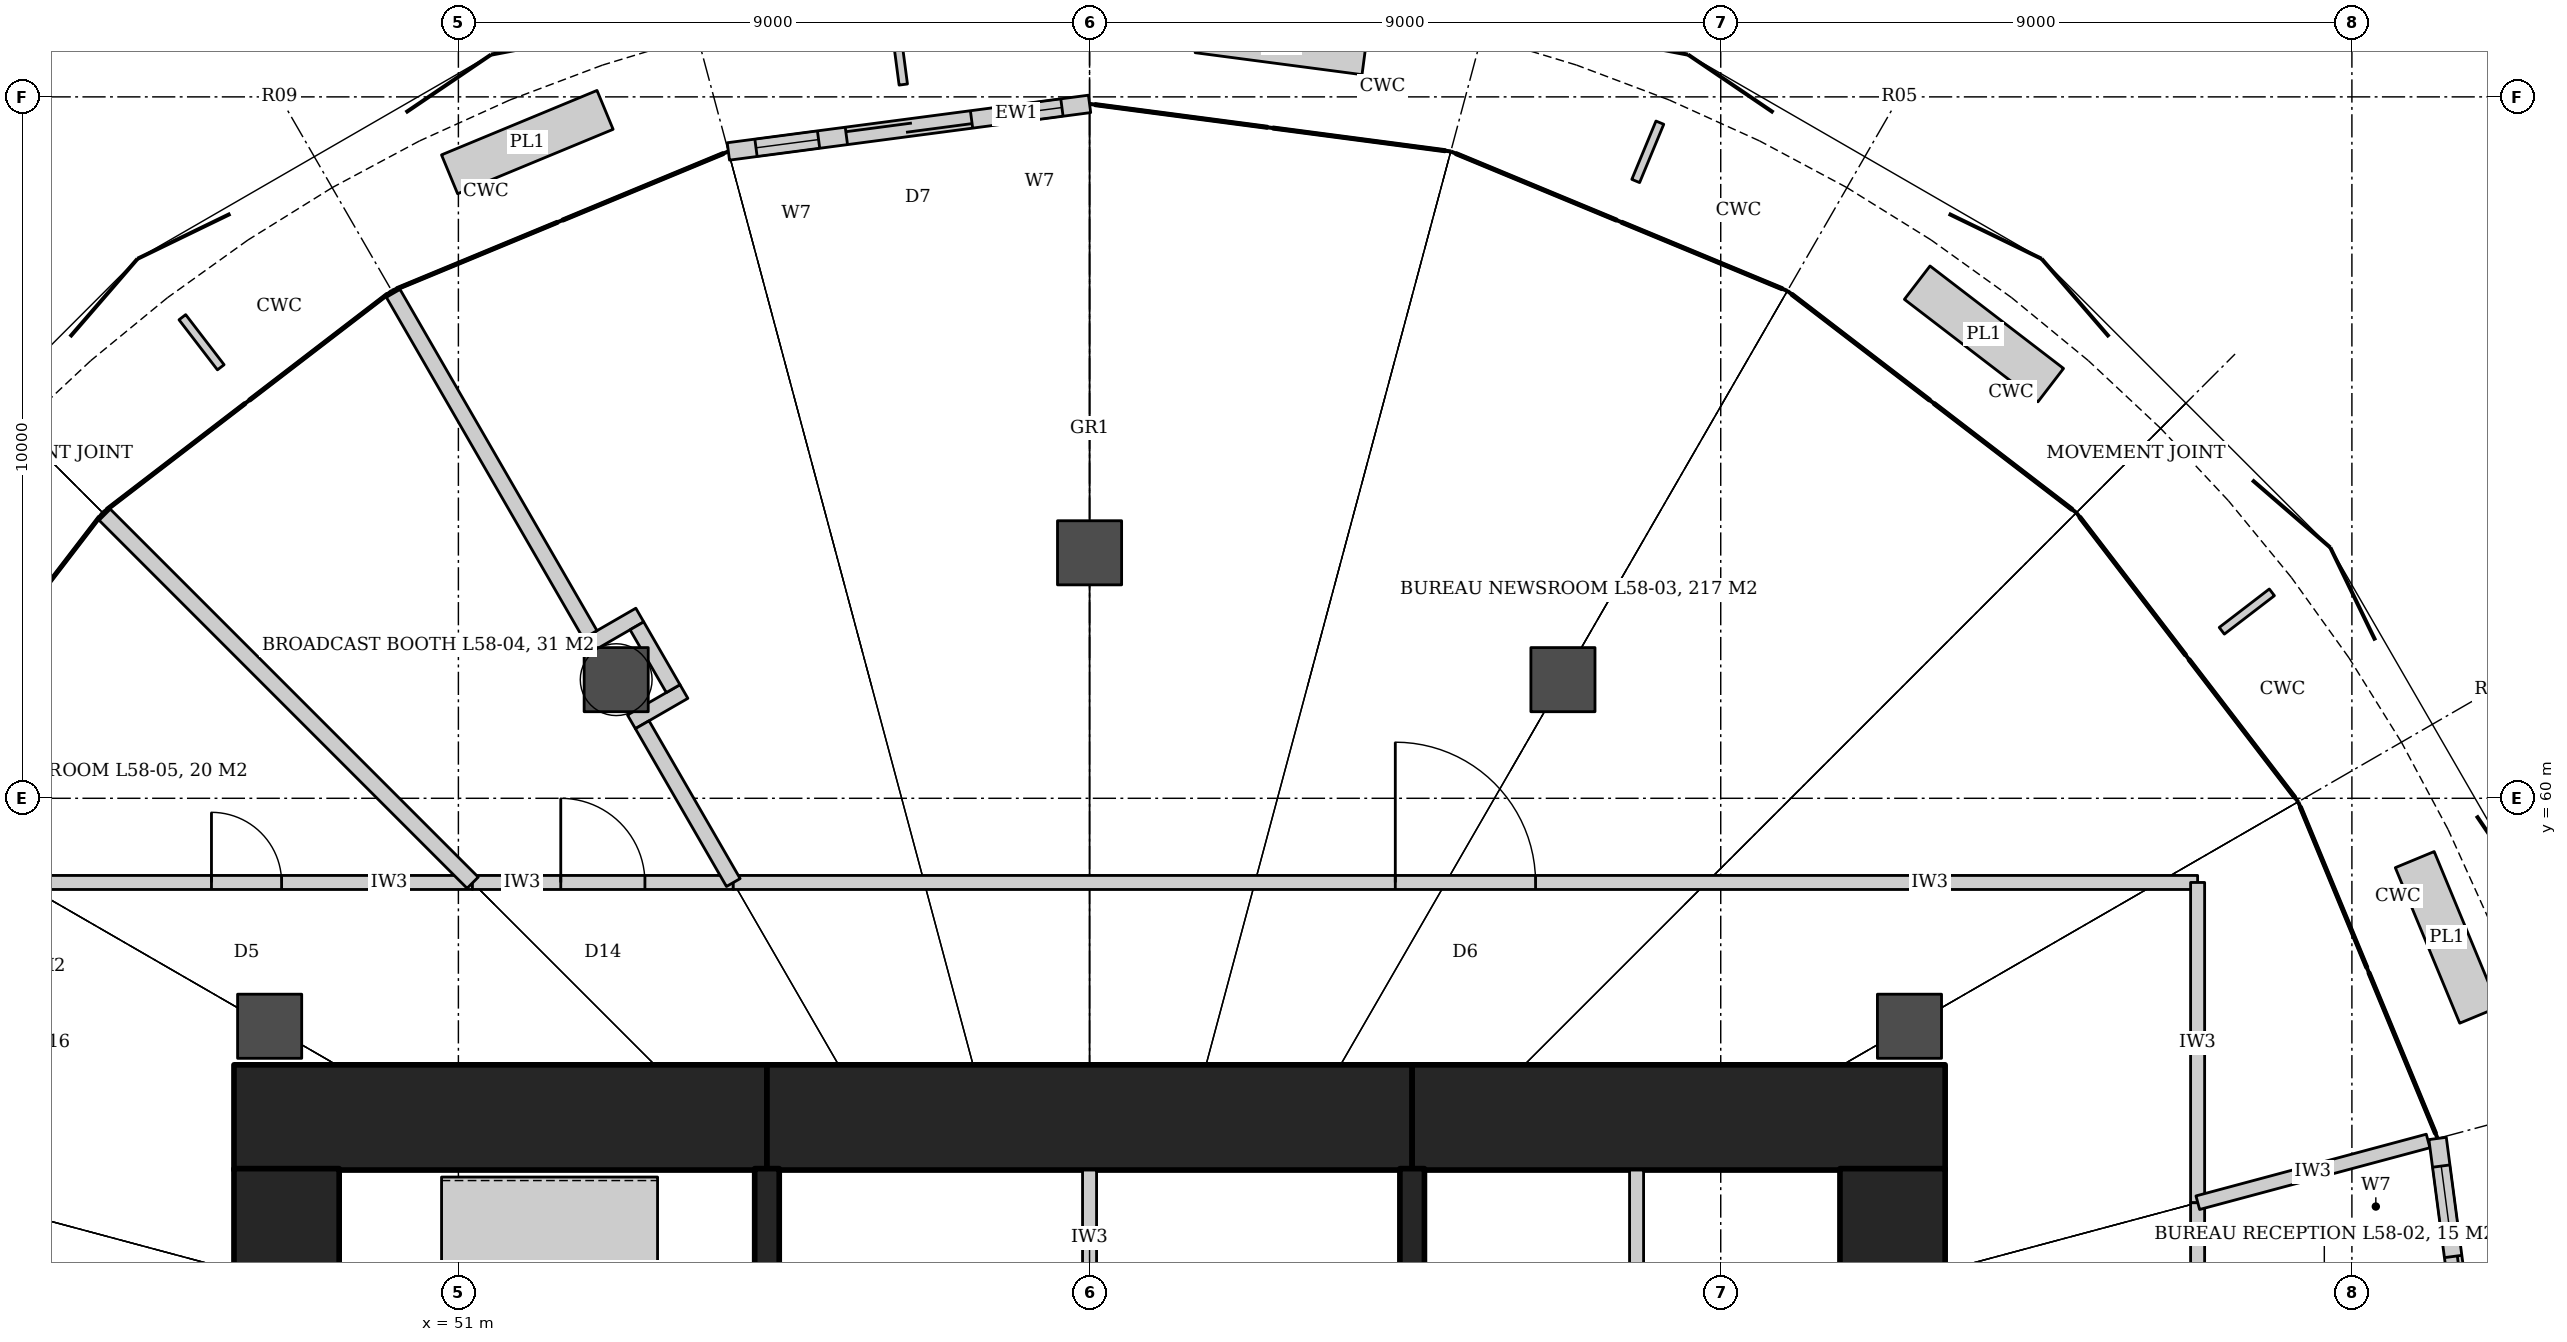
"""IFC4 building model, lengths in metres.
Left out: names, types, materials, properties, quantities, classifications, styles, units other than length and angle.
Written with IfcOpenShell. Run it as: python <this file> out.ifc"""

import sys

from ifc_helpers import new_model, si_unit, direction, frame, frame_2d, origin, origin_2d, place, context, subcontext, project, spatial, rectangle, hollow_circle, extrude, element, fill, save


model = new_model("IFC4")
c1 = context("Model", 3, precision=1e-05, world=origin(), true_north=direction((0.0, 1.0)))
c2 = subcontext(c1, "Body", "Model", "MODEL_VIEW")
j1 = project(units=[si_unit("LENGTHUNIT", "METRE"), si_unit("PLANEANGLEUNIT", "RADIAN")], contexts=[c1])
p1 = place(None, origin())
s1 = spatial("IfcSite", under=j1, at=p1, CompositionType="ELEMENT")
p2 = place(p1, origin())
s2 = spatial("IfcBuilding", under=s1, at=p2, CompositionType="ELEMENT")
p3 = place(p2, frame((0.0, 0.0, 252.8)))
s3 = spatial("IfcBuildingStorey", under=s2, at=p3, CompositionType="ELEMENT", Elevation=252.8)
p4 = place(p3, frame((47.8, 55.45, 0.0), z_axis=(0.0, 0.0, 1.0), x_axis=(1.0, 0.0, 0.0)))
e1 = element("IfcWall", 1, at=p4, inside=s3, PredefinedType="SHEAR", context=c2, shape_type="SweptSolid", body=[
    extrude(rectangle(XDim=7.6, YDim=1.5, at=frame_2d((3.8, 0.0))), origin(), (0.0, 0.0, 1.0), 4.2),
])
p5 = place(p3, frame((55.4, 55.45, 0.0), z_axis=(0.0, 0.0, 1.0), x_axis=(1.0, 0.0, 0.0)))
e2 = element("IfcWall", 2, at=p5, inside=s3, PredefinedType="SHEAR", context=c2, shape_type="SweptSolid", body=[
    extrude(rectangle(XDim=9.2, YDim=1.5, at=frame_2d((4.6, 0.0))), origin(), (0.0, 0.0, 1.0), 4.2),
])
p6 = place(p3, frame((64.6, 55.45, 0.0), z_axis=(0.0, 0.0, 1.0), x_axis=(1.0, 0.0, 0.0)))
e3 = element("IfcWall", 3, at=p6, inside=s3, PredefinedType="SHEAR", context=c2, shape_type="SweptSolid", body=[
    extrude(rectangle(XDim=7.6, YDim=1.5, at=frame_2d((3.8, 0.0))), origin(), (0.0, 0.0, 1.0), 4.2),
])
for number, where, z_axis, x_axis in (
    (4, (71.45, 51.5, 0.0), (0.0, 0.0, 1.0), (0.0, 1.0, 0.0)),
    (5, (48.55, 51.5, 0.0), (0.0, 0.0, 1.0), (0.0, 1.0, 0.0)),
):
    element("IfcWall", number, at=place(p3, frame(where, z_axis=z_axis, x_axis=x_axis)), inside=s3, PredefinedType="SHEAR", context=c2, shape_type="SweptSolid", body=[
        extrude(rectangle(XDim=3.22, YDim=1.5, at=frame_2d((1.61, 0.0))), origin(), (0.0, 0.0, 1.0), 4.2),
    ])
for number, where, z_axis, x_axis in (
    (6, (55.4, 51.655, 0.0), (0.0, 0.0, 1.0), (0.0, 1.0, 0.0)),
    (7, (64.6, 51.655, 0.0), (0.0, 0.0, 1.0), (0.0, 1.0, 0.0)),
):
    element("IfcWall", number, at=place(p3, frame(where, z_axis=z_axis, x_axis=x_axis)), inside=s3, PredefinedType="SHEAR", context=c2, shape_type="SweptSolid", body=[
        extrude(rectangle(XDim=3.065, YDim=0.35, at=frame_2d((1.532, 0.0))), origin(), (0.0, 0.0, 1.0), 4.2),
    ])
for number, where, z_axis, x_axis in (
    (8, (71.691, 56.75, 0.0), (0.0, 0.0, 1.0), (1.0, 0.0, 0.0)),
    (9, (66.75, 61.691, 0.0), (0.0, 0.0, 1.0), (1.0, 0.0, 0.0)),
    (10, (60.0, 63.5, 0.0), (0.0, 0.0, 1.0), (1.0, 0.0, 0.0)),
    (11, (53.25, 61.691, 0.0), (0.0, 0.0, 1.0), (1.0, 0.0, 0.0)),
    (12, (48.309, 56.75, 0.0), (0.0, 0.0, 1.0), (1.0, 0.0, 0.0)),
):
    element("IfcColumn", number, at=place(p3, frame(where, z_axis=z_axis, x_axis=x_axis)), inside=s3, PredefinedType="COLUMN", context=c2, shape_type="SweptSolid", body=[
        extrude(hollow_circle(Radius=0.457, WallThickness=0.045, at=origin_2d()), origin(), (0.0, 0.0, 1.0), 4.2),
    ])
p7 = place(p3, frame((44.758, 58.8, 0.0), z_axis=(0.0, 0.0, 1.0), x_axis=(1.0, 0.0, 0.0)))
e13 = element("IfcWall", 13, at=p7, inside=s3, PredefinedType="PARTITIONING", context=c2, shape_type="SweptSolid", body=[
    extrude(rectangle(XDim=6.442, YDim=0.2, at=frame_2d((3.221, 0.0))), origin(), (0.0, 0.0, 1.0), 3.02),
])
p8 = place(p7, frame((2.721, 0.0, 0.0)))
e14 = element("IfcOpeningElement", 14, at=p8, cuts=e13, PredefinedType="OPENING", context=c2, shape_type="SweptSolid", body=[
    extrude(rectangle(XDim=1.0, YDim=2.1, at=frame_2d((0.5, 1.05))), frame((0.0, 0.11, 0.0), z_axis=(0.0, -1.0, 0.0), x_axis=(1.0, 0.0, 0.0)), (0.0, 0.0, 1.0), 0.22),
])
p9 = place(p3, frame((51.2, 58.8, 0.0), z_axis=(0.0, 0.0, 1.0), x_axis=(1.0, 0.0, 0.0)))
e15 = element("IfcWall", 15, at=p9, inside=s3, PredefinedType="PARTITIONING", context=c2, shape_type="SweptSolid", body=[
    extrude(rectangle(XDim=3.719, YDim=0.2, at=frame_2d((1.86, 0.0))), origin(), (0.0, 0.0, 1.0), 3.04),
])
p10 = place(p9, frame((1.26, 0.0, 0.0)))
e16 = element("IfcOpeningElement", 16, at=p10, cuts=e15, PredefinedType="OPENING", context=c2, shape_type="SweptSolid", body=[
    extrude(rectangle(XDim=1.2, YDim=2.4, at=frame_2d((0.6, 1.2))), frame((0.0, 0.11, 0.0), z_axis=(0.0, -1.0, 0.0), x_axis=(1.0, 0.0, 0.0)), (0.0, 0.0, 1.0), 0.22),
])
p11 = place(p3, frame((54.919, 58.8, 0.0), z_axis=(0.0, 0.0, 1.0), x_axis=(1.0, 0.0, 0.0)))
e17 = element("IfcWall", 17, at=p11, inside=s3, PredefinedType="PARTITIONING", context=c2, shape_type="SweptSolid", body=[
    extrude(rectangle(XDim=20.881, YDim=0.2, at=frame_2d((10.44, 0.0))), origin(), (0.0, 0.0, 1.0), 3.02),
])
p12 = place(p11, frame((9.44, 0.0, 0.0)))
e18 = element("IfcOpeningElement", 18, at=p12, cuts=e17, PredefinedType="OPENING", context=c2, shape_type="SweptSolid", body=[
    extrude(rectangle(XDim=2.0, YDim=2.1, at=frame_2d((1.0, 1.05))), frame((0.0, 0.11, 0.0), z_axis=(0.0, -1.0, 0.0), x_axis=(1.0, 0.0, 0.0)), (0.0, 0.0, 1.0), 0.22),
])
p13 = place(p3, frame((75.8, 58.8, 0.0), z_axis=(0.0, 0.0, 1.0), x_axis=(0.0, -1.0, 0.0)))
e19 = element("IfcWall", 19, at=p13, inside=s3, PredefinedType="PARTITIONING", context=c2, shape_type="SweptSolid", body=[
    extrude(rectangle(XDim=4.566, YDim=0.2, at=frame_2d((2.283, 0.0))), origin(), (0.0, 0.0, 1.0), 3.02),
])
p14 = place(p3, frame((75.8, 54.234, 0.0), z_axis=(0.0, 0.0, 1.0), x_axis=(0.0, -1.0, 0.0)))
e20 = element("IfcWall", 20, at=p14, inside=s3, PredefinedType="PARTITIONING", context=c2, shape_type="SweptSolid", body=[
    extrude(rectangle(XDim=4.234, YDim=0.2, at=frame_2d((2.117, 0.0))), origin(), (0.0, 0.0, 1.0), 3.02),
])
p15 = place(p14, frame((1.317, 0.0, 0.0)))
e21 = element("IfcOpeningElement", 21, at=p15, cuts=e20, PredefinedType="OPENING", context=c2, shape_type="SweptSolid", body=[
    extrude(rectangle(XDim=1.6, YDim=2.4, at=frame_2d((0.8, 1.2))), frame((0.0, 0.11, 0.0), z_axis=(0.0, -1.0, 0.0), x_axis=(1.0, 0.0, 0.0)), (0.0, 0.0, 1.0), 0.22),
])
p16 = place(p3, frame((75.802, 54.234, 0.0), z_axis=(0.0, 0.0, 1.0), x_axis=(0.965933949521, 0.258788726886, 0.0)))
e22 = element("IfcWall", 22, at=p16, inside=s3, PredefinedType="PARTITIONING", context=c2, shape_type="SweptSolid", body=[
    extrude(rectangle(XDim=3.4, YDim=0.2, at=frame_2d((1.7, 0.0))), origin(), (0.0, 0.0, 1.0), 3.02),
])
p17 = place(p3, frame((53.467, 61.09, 0.0), z_axis=(0.0, 0.0, 1.0), x_axis=(0.86599279096, 0.500056482814, 0.0)))
e23 = element("IfcWall", 23, at=p17, inside=s3, PredefinedType="PARTITIONING", context=c2, shape_type="SweptSolid", body=[
    extrude(rectangle(XDim=0.865, YDim=0.225, at=frame_2d((0.432, 0.0))), origin(), (0.0, 0.0, 1.0), 3.02),
])
p18 = place(p3, frame((52.838, 62.18, 0.0), z_axis=(0.0, 0.0, 1.0), x_axis=(0.866044474677, 0.49996696679, 0.0)))
e24 = element("IfcWall", 24, at=p18, inside=s3, PredefinedType="PARTITIONING", context=c2, shape_type="SweptSolid", body=[
    extrude(rectangle(XDim=0.864, YDim=0.225, at=frame_2d((0.432, 0.0))), origin(), (0.0, 0.0, 1.0), 3.02),
])
p19 = place(p3, frame((54.062, 61.563, 0.0), z_axis=(0.0, 0.0, 1.0), x_axis=(-0.499974592989, 0.866040072032, 0.0)))
e25 = element("IfcWall", 25, at=p19, inside=s3, PredefinedType="PARTITIONING", context=c2, shape_type="SweptSolid", body=[
    extrude(rectangle(XDim=1.034, YDim=0.225, at=frame_2d((0.517, 0.0))), origin(), (0.0, 0.0, 1.0), 3.02),
])
p20 = place(p3, frame((54.92, 58.799, 0.0), z_axis=(0.0, 0.0, 1.0), x_axis=(-0.499939380126, 0.866060399857, 0.0)))
e26 = element("IfcWall", 26, at=p20, inside=s3, PredefinedType="PARTITIONING", context=c2, shape_type="SweptSolid", body=[
    extrude(rectangle(XDim=2.598, YDim=0.225, at=frame_2d((1.299, 0.0))), origin(), (0.0, 0.0, 1.0), 3.04),
])
p21 = place(p3, frame((52.879, 62.334, 0.0), z_axis=(0.0, 0.0, 1.0), x_axis=(-0.499985783765, 0.866033611376, 0.0)))
e27 = element("IfcWall", 27, at=p21, inside=s3, PredefinedType="PARTITIONING", context=c2, shape_type="SweptSolid", body=[
    extrude(rectangle(XDim=5.618, YDim=0.225, at=frame_2d((2.809, 0.0))), origin(), (0.0, 0.0, 1.0), 3.02),
])
p22 = place(p3, frame((51.204, 58.796, 0.0), z_axis=(0.0, 0.0, 1.0), x_axis=(-0.707106781187, 0.707106781187, 0.0)))
e28 = element("IfcWall", 28, at=p22, inside=s3, PredefinedType="PARTITIONING", context=c2, shape_type="SweptSolid", body=[
    extrude(rectangle(XDim=7.42, YDim=0.225, at=frame_2d((3.71, 0.0))), origin(), (0.0, 0.0, 1.0), 3.02),
])
p23 = place(p3, frame((79.9, 50.0, 0.0), z_axis=(0.0, 0.0, 1.0), x_axis=(-0.130510435174, 0.991446935701, 0.0)))
e29 = element("IfcWall", 29, at=p23, inside=s3, PredefinedType="SOLIDWALL", context=c2, shape_type="SweptSolid", body=[
    extrude(rectangle(XDim=5.195, YDim=0.25, at=frame_2d((2.597, 0.0))), origin(), (0.0, 0.0, 1.0), 4.04),
])
p24 = place(p23, frame((1.698, 0.0, 0.0)))
e30 = element("IfcOpeningElement", 30, at=p24, cuts=e29, PredefinedType="OPENING", context=c2, shape_type="SweptSolid", body=[
    extrude(rectangle(XDim=1.8, YDim=2.4, at=frame_2d((0.9, 1.2))), frame((0.0, 0.135, 0.0), z_axis=(0.0, -1.0, 0.0), x_axis=(1.0, 0.0, 0.0)), (0.0, 0.0, 1.0), 0.27),
])
p25 = place(p23, frame((0.397, 0.0, 0.0)))
e31 = element("IfcOpeningElement", 31, at=p25, cuts=e29, PredefinedType="OPENING", context=c2, shape_type="SweptSolid", body=[
    extrude(rectangle(XDim=0.9, YDim=2.4, at=frame_2d((0.45, 1.2))), frame((0.0, 0.135, 0.0), z_axis=(0.0, -1.0, 0.0), x_axis=(1.0, 0.0, 0.0)), (0.0, 0.0, 1.0), 0.27),
])
p26 = place(p23, frame((3.897, 0.0, 0.0)))
e32 = element("IfcOpeningElement", 32, at=p26, cuts=e29, PredefinedType="OPENING", context=c2, shape_type="SweptSolid", body=[
    extrude(rectangle(XDim=0.9, YDim=2.4, at=frame_2d((0.45, 1.2))), frame((0.0, 0.135, 0.0), z_axis=(0.0, -1.0, 0.0), x_axis=(1.0, 0.0, 0.0)), (0.0, 0.0, 1.0), 0.27),
])
p27 = place(p3, frame((60.0, 69.9, 0.0), z_axis=(0.0, 0.0, 1.0), x_axis=(-0.991446935701, -0.130510435174, 0.0)))
e33 = element("IfcWall", 33, at=p27, inside=s3, PredefinedType="SOLIDWALL", context=c2, shape_type="SweptSolid", body=[
    extrude(rectangle(XDim=5.195, YDim=0.25, at=frame_2d((2.597, 0.0))), origin(), (0.0, 0.0, 1.0), 4.04),
])
p28 = place(p27, frame((1.698, 0.0, 0.0)))
e34 = element("IfcOpeningElement", 34, at=p28, cuts=e33, PredefinedType="OPENING", context=c2, shape_type="SweptSolid", body=[
    extrude(rectangle(XDim=1.8, YDim=2.4, at=frame_2d((0.9, 1.2))), frame((0.0, 0.135, 0.0), z_axis=(0.0, -1.0, 0.0), x_axis=(1.0, 0.0, 0.0)), (0.0, 0.0, 1.0), 0.27),
])
p29 = place(p27, frame((0.397, 0.0, 0.0)))
e35 = element("IfcOpeningElement", 35, at=p29, cuts=e33, PredefinedType="OPENING", context=c2, shape_type="SweptSolid", body=[
    extrude(rectangle(XDim=0.9, YDim=2.4, at=frame_2d((0.45, 1.2))), frame((0.0, 0.135, 0.0), z_axis=(0.0, -1.0, 0.0), x_axis=(1.0, 0.0, 0.0)), (0.0, 0.0, 1.0), 0.27),
])
p30 = place(p27, frame((3.897, 0.0, 0.0)))
e36 = element("IfcOpeningElement", 36, at=p30, cuts=e33, PredefinedType="OPENING", context=c2, shape_type="SweptSolid", body=[
    extrude(rectangle(XDim=0.9, YDim=2.4, at=frame_2d((0.45, 1.2))), frame((0.0, 0.135, 0.0), z_axis=(0.0, -1.0, 0.0), x_axis=(1.0, 0.0, 0.0)), (0.0, 0.0, 1.0), 0.27),
])
p31 = place(p3, frame((67.8, 51.675, 0.0), z_axis=(0.0, 0.0, 1.0), x_axis=(0.0, 1.0, 0.0)))
e37 = element("IfcWall", 37, at=p31, inside=s3, PredefinedType="PARTITIONING", context=c2, shape_type="SweptSolid", body=[
    extrude(rectangle(XDim=3.025, YDim=0.2, at=frame_2d((1.512, 0.0))), origin(), (0.0, 0.0, 1.0), 4.2),
])
p32 = place(p3, frame((60.0, 51.675, 0.0), z_axis=(0.0, 0.0, 1.0), x_axis=(0.0, 1.0, 0.0)))
e38 = element("IfcWall", 38, at=p32, inside=s3, PredefinedType="PARTITIONING", context=c2, shape_type="SweptSolid", body=[
    extrude(rectangle(XDim=3.025, YDim=0.2, at=frame_2d((1.512, 0.0))), origin(), (0.0, 0.0, 1.0), 4.04),
])
p33 = place(p12, origin())
e39 = element("IfcDoor", 39, at=p33, inside=s3, OperationType="DOUBLE_DOOR_DOUBLE_SWING", PredefinedType="DOOR", context=c2, shape_type="SweptSolid", body=[
    extrude(rectangle(XDim=2.0, YDim=2.1, at=frame_2d((1.0, 1.05))), frame((0.0, 0.025, 0.0), z_axis=(0.0, -1.0, 0.0), x_axis=(1.0, 0.0, 0.0)), (0.0, 0.0, 1.0), 0.05),
])
fill(e18, e39)
p34 = place(p10, origin())
e40 = element("IfcDoor", 40, at=p34, inside=s3, OperationType="SINGLE_SWING_LEFT", PredefinedType="DOOR", context=c2, shape_type="SweptSolid", body=[
    extrude(rectangle(XDim=1.2, YDim=2.4, at=frame_2d((0.6, 1.2))), frame((0.0, 0.025, 0.0), z_axis=(0.0, -1.0, 0.0), x_axis=(1.0, 0.0, 0.0)), (0.0, 0.0, 1.0), 0.05),
])
fill(e16, e40)
p35 = place(p8, origin())
e41 = element("IfcDoor", 41, at=p35, inside=s3, OperationType="SINGLE_SWING_LEFT", PredefinedType="DOOR", context=c2, shape_type="SweptSolid", body=[
    extrude(rectangle(XDim=1.0, YDim=2.1, at=frame_2d((0.5, 1.05))), frame((0.0, 0.025, 0.0), z_axis=(0.0, -1.0, 0.0), x_axis=(1.0, 0.0, 0.0)), (0.0, 0.0, 1.0), 0.05),
])
fill(e14, e41)
p36 = place(p24, origin())
e42 = element("IfcDoor", 42, at=p36, inside=s3, OperationType="DOUBLE_DOOR_SLIDING", PredefinedType="DOOR", context=c2, shape_type="SweptSolid", body=[
    extrude(rectangle(XDim=1.8, YDim=2.4, at=frame_2d((0.9, 1.2))), frame((0.0, 0.025, 0.0), z_axis=(0.0, -1.0, 0.0), x_axis=(1.0, 0.0, 0.0)), (0.0, 0.0, 1.0), 0.05),
])
fill(e30, e42)
p37 = place(p26, origin())
e43 = element("IfcWindow", 43, at=p37, inside=s3, PartitioningType="SINGLE_PANEL", PredefinedType="WINDOW", context=c2, shape_type="SweptSolid", body=[
    extrude(rectangle(XDim=0.9, YDim=2.4, at=frame_2d((0.45, 1.2))), frame((0.0, 0.03, 0.0), z_axis=(0.0, -1.0, 0.0), x_axis=(1.0, 0.0, 0.0)), (0.0, 0.0, 1.0), 0.06),
])
fill(e32, e43)
p38 = place(p28, origin())
e44 = element("IfcDoor", 44, at=p38, inside=s3, OperationType="DOUBLE_DOOR_SLIDING", PredefinedType="DOOR", context=c2, shape_type="SweptSolid", body=[
    extrude(rectangle(XDim=1.8, YDim=2.4, at=frame_2d((0.9, 1.2))), frame((0.0, 0.025, 0.0), z_axis=(0.0, -1.0, 0.0), x_axis=(1.0, 0.0, 0.0)), (0.0, 0.0, 1.0), 0.05),
])
fill(e34, e44)
p39 = place(p29, origin())
e45 = element("IfcWindow", 45, at=p39, inside=s3, PartitioningType="SINGLE_PANEL", PredefinedType="WINDOW", context=c2, shape_type="SweptSolid", body=[
    extrude(rectangle(XDim=0.9, YDim=2.4, at=frame_2d((0.45, 1.2))), frame((0.0, 0.03, 0.0), z_axis=(0.0, -1.0, 0.0), x_axis=(1.0, 0.0, 0.0)), (0.0, 0.0, 1.0), 0.06),
])
fill(e35, e45)
p40 = place(p30, origin())
e46 = element("IfcWindow", 46, at=p40, inside=s3, PartitioningType="SINGLE_PANEL", PredefinedType="WINDOW", context=c2, shape_type="SweptSolid", body=[
    extrude(rectangle(XDim=0.9, YDim=2.4, at=frame_2d((0.45, 1.2))), frame((0.0, 0.03, 0.0), z_axis=(0.0, -1.0, 0.0), x_axis=(1.0, 0.0, 0.0)), (0.0, 0.0, 1.0), 0.06),
])
fill(e36, e46)
save(model, sys.argv[1])
